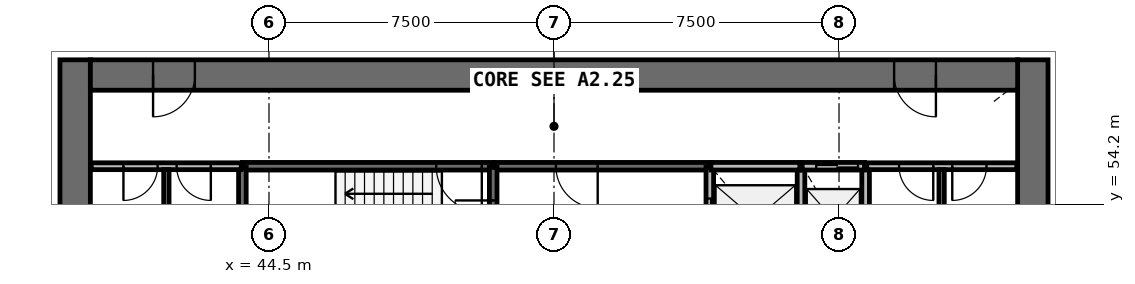
"""IFC4 building model, lengths in metres.
Left out: names, types, materials, properties, quantities, classifications, styles, units other than length and angle.
Written with IfcOpenShell. Run it as: python <this file> out.ifc"""

import sys

from ifc_helpers import new_model, si_unit, direction, frame, frame_2d, origin, place, context, subcontext, project, spatial, rectangle, extrude, source, transform, mapped, element, fill, save


model = new_model("IFC4")
c1 = context("Model", 3, precision=1e-05, world=origin(), true_north=direction((0.0, 1.0)))
c2 = subcontext(c1, "Body", "Model", "MODEL_VIEW")
j1 = project(units=[si_unit("LENGTHUNIT", "METRE"), si_unit("PLANEANGLEUNIT", "RADIAN")], contexts=[c1])
p1 = place(None, origin())
s1 = spatial("IfcSite", under=j1, at=p1, CompositionType="ELEMENT")
p2 = place(p1, origin())
s2 = spatial("IfcBuilding", under=s1, at=p2, CompositionType="ELEMENT")
p3 = place(p2, frame((0.0, 0.0, 104.4)))
s3 = spatial("IfcBuildingStorey", under=s2, at=p3, CompositionType="ELEMENT", Elevation=104.4)
p4 = place(p3, frame((64.6, 38.0, 0.0), z_axis=(0.0, 0.0, 1.0), x_axis=(0.0, 1.0, 0.0)))
e1 = element("IfcWall", 1, at=p4, inside=s3, PredefinedType="SHEAR", context=c2, shape_type="SweptSolid", body=[
    extrude(rectangle(XDim=20.0, YDim=0.8, at=frame_2d((10.0, 0.0))), origin(), (0.0, 0.0, 1.0), 4.1),
])
p5 = place(p4, frame((9.1, 0.0, 0.0)))
e2 = element("IfcOpeningElement", 2, at=p5, cuts=e1, PredefinedType="OPENING", context=c2, shape_type="SweptSolid", body=[
    extrude(rectangle(XDim=1.8, YDim=2.1, at=frame_2d((0.9, 1.05))), frame((0.0, 0.41, 0.0), z_axis=(0.0, -1.0, 0.0), x_axis=(1.0, 0.0, 0.0)), (0.0, 0.0, 1.0), 0.82),
])
p6 = place(p3, frame((39.4, 58.0, 0.0), z_axis=(0.0, 0.0, 1.0), x_axis=(0.0, -1.0, 0.0)))
e3 = element("IfcWall", 3, at=p6, inside=s3, PredefinedType="SHEAR", context=c2, shape_type="SweptSolid", body=[
    extrude(rectangle(XDim=20.0, YDim=0.8, at=frame_2d((10.0, 0.0))), origin(), (0.0, 0.0, 1.0), 4.1),
])
p7 = place(p6, frame((9.1, 0.0, 0.0)))
e4 = element("IfcOpeningElement", 4, at=p7, cuts=e3, PredefinedType="OPENING", context=c2, shape_type="SweptSolid", body=[
    extrude(rectangle(XDim=1.8, YDim=2.1, at=frame_2d((0.9, 1.05))), frame((0.0, 0.41, 0.0), z_axis=(0.0, -1.0, 0.0), x_axis=(1.0, 0.0, 0.0)), (0.0, 0.0, 1.0), 0.82),
])
p8 = place(p3, frame((64.2, 57.6, 0.0), z_axis=(0.0, 0.0, 1.0), x_axis=(-1.0, 0.0, 0.0)))
e5 = element("IfcWall", 5, at=p8, inside=s3, PredefinedType="SHEAR", context=c2, shape_type="SweptSolid", body=[
    extrude(rectangle(XDim=24.4, YDim=0.8, at=frame_2d((12.2, 0.0))), origin(), (0.0, 0.0, 1.0), 4.1),
])
p9 = place(p8, frame((21.65, 0.0, 0.0)))
e6 = element("IfcOpeningElement", 6, at=p9, cuts=e5, PredefinedType="OPENING", context=c2, shape_type="SweptSolid", body=[
    extrude(rectangle(XDim=1.1, YDim=2.1, at=frame_2d((0.55, 1.05))), frame((0.0, 0.41, 0.0), z_axis=(0.0, -1.0, 0.0), x_axis=(1.0, 0.0, 0.0)), (0.0, 0.0, 1.0), 0.82),
])
p10 = place(p8, frame((2.15, 0.0, 0.0)))
e7 = element("IfcOpeningElement", 7, at=p10, cuts=e5, PredefinedType="OPENING", context=c2, shape_type="SweptSolid", body=[
    extrude(rectangle(XDim=1.1, YDim=2.1, at=frame_2d((0.55, 1.05))), frame((0.0, 0.41, 0.0), z_axis=(0.0, -1.0, 0.0), x_axis=(1.0, 0.0, 0.0)), (0.0, 0.0, 1.0), 0.82),
])
p11 = place(p3, frame((50.4, 55.2, 0.0), z_axis=(0.0, 0.0, 1.0), x_axis=(-1.0, 0.0, 0.0)))
e8 = element("IfcWall", 8, at=p11, inside=s3, PredefinedType="SOLIDWALL", context=c2, shape_type="SweptSolid", body=[
    extrude(rectangle(XDim=6.6, YDim=0.2, at=frame_2d((3.3, 0.0))), origin(), (0.0, 0.0, 1.0), 3.7),
])
p12 = place(p11, frame((0.3, 0.0, 0.0)))
e9 = element("IfcOpeningElement", 9, at=p12, cuts=e8, PredefinedType="OPENING", context=c2, shape_type="SweptSolid", body=[
    extrude(rectangle(XDim=1.2, YDim=2.1, at=frame_2d((0.6, 1.05))), frame((0.0, 0.11, 0.0), z_axis=(0.0, -1.0, 0.0), x_axis=(1.0, 0.0, 0.0)), (0.0, 0.0, 1.0), 0.22),
])
p13 = place(p3, frame((56.1, 55.2, 0.0), z_axis=(0.0, 0.0, 1.0), x_axis=(-1.0, 0.0, 0.0)))
e10 = element("IfcWall", 10, at=p13, inside=s3, PredefinedType="SOLIDWALL", context=c2, shape_type="SweptSolid", body=[
    extrude(rectangle(XDim=5.67, YDim=0.2, at=frame_2d((2.835, 0.0))), origin(), (0.0, 0.0, 1.0), 3.7),
])
p14 = place(p13, frame((2.95, 0.0, 0.0)))
e11 = element("IfcOpeningElement", 11, at=p14, cuts=e10, PredefinedType="OPENING", context=c2, shape_type="SweptSolid", body=[
    extrude(rectangle(XDim=1.1, YDim=2.1, at=frame_2d((0.55, 1.05))), frame((0.0, 0.11, 0.0), z_axis=(0.0, -1.0, 0.0), x_axis=(1.0, 0.0, 0.0)), (0.0, 0.0, 1.0), 0.22),
])
p15 = place(p3, frame((50.4, 52.4, 0.0), z_axis=(0.0, 0.0, 1.0), x_axis=(0.0, 1.0, 0.0)))
e12 = element("IfcWall", 12, at=p15, inside=s3, PredefinedType="SOLIDWALL", context=c2, shape_type="SweptSolid", body=[
    extrude(rectangle(XDim=2.77, YDim=0.2, at=frame_2d((1.385, 0.0))), origin(), (0.0, 0.0, 1.0), 3.7),
])
p16 = place(p15, frame((0.9, 0.0, 0.0)))
e13 = element("IfcOpeningElement", 13, at=p16, cuts=e12, PredefinedType="OPENING", context=c2, shape_type="SweptSolid", body=[
    extrude(rectangle(XDim=1.0, YDim=2.1, at=frame_2d((0.5, 1.05))), frame((0.0, 0.11, 0.0), z_axis=(0.0, -1.0, 0.0), x_axis=(1.0, 0.0, 0.0)), (0.0, 0.0, 1.0), 0.22),
])
p17 = place(p3, frame((56.1, 55.17, 0.0), z_axis=(0.0, 0.0, 1.0), x_axis=(0.0, -1.0, 0.0)))
e14 = element("IfcWall", 14, at=p17, inside=s3, PredefinedType="SOLIDWALL", context=c2, shape_type="SweptSolid", body=[
    extrude(rectangle(XDim=2.77, YDim=0.2, at=frame_2d((1.385, 0.0))), origin(), (0.0, 0.0, 1.0), 3.7),
])
p18 = place(p17, frame((0.82, 0.0, 0.0)))
e15 = element("IfcOpeningElement", 15, at=p18, cuts=e14, PredefinedType="OPENING", context=c2, shape_type="SweptSolid", body=[
    extrude(rectangle(XDim=1.1, YDim=2.1, at=frame_2d((0.55, 1.05))), frame((0.0, 0.11, 0.0), z_axis=(0.0, -1.0, 0.0), x_axis=(1.0, 0.0, 0.0)), (0.0, 0.0, 1.0), 0.22),
])
for number, where, z_axis, x_axis in (
    (16, (58.5, 52.4, 0.0), (0.0, 0.0, 1.0), (0.0, 1.0, 0.0)),
    (17, (60.2, 52.4, 0.0), (0.0, 0.0, 1.0), (0.0, 1.0, 0.0)),
):
    element("IfcWall", number, at=place(p3, frame(where, z_axis=z_axis, x_axis=x_axis)), inside=s3, PredefinedType="SOLIDWALL", context=c2, shape_type="SweptSolid", body=[
        extrude(rectangle(XDim=2.8, YDim=0.2, at=frame_2d((1.4, 0.0))), origin(), (0.0, 0.0, 1.0), 3.7),
    ])
p19 = place(p3, frame((58.47, 55.2, 0.0), z_axis=(0.0, 0.0, 1.0), x_axis=(-1.0, 0.0, 0.0)))
e18 = element("IfcWall", 18, at=p19, inside=s3, PredefinedType="SOLIDWALL", context=c2, shape_type="SweptSolid", body=[
    extrude(rectangle(XDim=2.34, YDim=0.2, at=frame_2d((1.17, 0.0))), origin(), (0.0, 0.0, 1.0), 3.7),
])
p20 = place(p3, frame((43.8, 55.17, 0.0), z_axis=(0.0, 0.0, 1.0), x_axis=(0.0, -1.0, 0.0)))
e19 = element("IfcWall", 19, at=p20, inside=s3, PredefinedType="SOLIDWALL", context=c2, shape_type="SweptSolid", body=[
    extrude(rectangle(XDim=2.14, YDim=0.2, at=frame_2d((1.07, 0.0))), origin(), (0.0, 0.0, 1.0), 3.7),
])
p21 = place(p3, frame((60.17, 55.2, 0.0), z_axis=(0.0, 0.0, 1.0), x_axis=(-1.0, 0.0, 0.0)))
e20 = element("IfcWall", 20, at=p21, inside=s3, PredefinedType="SOLIDWALL", context=c2, shape_type="SweptSolid", body=[
    extrude(rectangle(XDim=1.64, YDim=0.2, at=frame_2d((0.82, 0.0))), origin(), (0.0, 0.0, 1.0), 3.7),
])
p22 = place(p21, frame((0.17, 0.0, 0.0)))
e21 = element("IfcOpeningElement", 21, at=p22, cuts=e20, PredefinedType="OPENING", context=c2, shape_type="SweptSolid", body=[
    extrude(rectangle(XDim=1.1, YDim=2.1, at=frame_2d((0.55, 1.05))), frame((0.0, 0.11, 0.0), z_axis=(0.0, -1.0, 0.0), x_axis=(1.0, 0.0, 0.0)), (0.0, 0.0, 1.0), 0.22),
])
p23 = place(p3, frame((64.18, 55.2, 0.0), z_axis=(0.0, 0.0, 1.0), x_axis=(-1.0, 0.0, 0.0)))
e22 = element("IfcWall", 22, at=p23, inside=s3, PredefinedType="PARTITIONING", context=c2, shape_type="SweptSolid", body=[
    extrude(rectangle(XDim=3.95, YDim=0.18, at=frame_2d((1.975, 0.0))), origin(), (0.0, 0.0, 1.0), 3.7),
])
p24 = place(p23, frame((2.2, 0.0, 0.0)))
e23 = element("IfcOpeningElement", 23, at=p24, cuts=e22, PredefinedType="OPENING", context=c2, shape_type="SweptSolid", body=[
    extrude(rectangle(XDim=0.9, YDim=2.1, at=frame_2d((0.45, 1.05))), frame((0.0, 0.1, 0.0), z_axis=(0.0, -1.0, 0.0), x_axis=(1.0, 0.0, 0.0)), (0.0, 0.0, 1.0), 0.2),
])
p25 = place(p23, frame((0.8, 0.0, 0.0)))
e24 = element("IfcOpeningElement", 24, at=p25, cuts=e22, PredefinedType="OPENING", context=c2, shape_type="SweptSolid", body=[
    extrude(rectangle(XDim=0.9, YDim=2.1, at=frame_2d((0.45, 1.05))), frame((0.0, 0.1, 0.0), z_axis=(0.0, -1.0, 0.0), x_axis=(1.0, 0.0, 0.0)), (0.0, 0.0, 1.0), 0.2),
])
p26 = place(p3, frame((43.77, 55.2, 0.0), z_axis=(0.0, 0.0, 1.0), x_axis=(-1.0, 0.0, 0.0)))
e25 = element("IfcWall", 25, at=p26, inside=s3, PredefinedType="PARTITIONING", context=c2, shape_type="SweptSolid", body=[
    extrude(rectangle(XDim=3.95, YDim=0.18, at=frame_2d((1.975, 0.0))), origin(), (0.0, 0.0, 1.0), 3.7),
])
p27 = place(p26, frame((2.2, 0.0, 0.0)))
e26 = element("IfcOpeningElement", 26, at=p27, cuts=e25, PredefinedType="OPENING", context=c2, shape_type="SweptSolid", body=[
    extrude(rectangle(XDim=0.9, YDim=2.1, at=frame_2d((0.45, 1.05))), frame((0.0, 0.1, 0.0), z_axis=(0.0, -1.0, 0.0), x_axis=(1.0, 0.0, 0.0)), (0.0, 0.0, 1.0), 0.2),
])
p28 = place(p26, frame((0.8, 0.0, 0.0)))
e27 = element("IfcOpeningElement", 27, at=p28, cuts=e25, PredefinedType="OPENING", context=c2, shape_type="SweptSolid", body=[
    extrude(rectangle(XDim=0.9, YDim=2.1, at=frame_2d((0.45, 1.05))), frame((0.0, 0.1, 0.0), z_axis=(0.0, -1.0, 0.0), x_axis=(1.0, 0.0, 0.0)), (0.0, 0.0, 1.0), 0.2),
])
p29 = place(p3, frame((62.2, 52.4, 0.0), z_axis=(0.0, 0.0, 1.0), x_axis=(0.0, 1.0, 0.0)))
e28 = element("IfcWall", 28, at=p29, inside=s3, PredefinedType="PARTITIONING", context=c2, shape_type="SweptSolid", body=[
    extrude(rectangle(XDim=2.71, YDim=0.14, at=frame_2d((1.355, 0.0))), origin(), (0.0, 0.0, 1.0), 2.9),
])
p30 = place(p3, frame((41.8, 53.1, 0.0), z_axis=(0.0, 0.0, 1.0), x_axis=(0.0, 1.0, 0.0)))
e29 = element("IfcWall", 29, at=p30, inside=s3, PredefinedType="PARTITIONING", context=c2, shape_type="SweptSolid", body=[
    extrude(rectangle(XDim=2.01, YDim=0.14, at=frame_2d((1.005, 0.0))), origin(), (0.0, 0.0, 1.0), 2.9),
])
m1 = source(origin(), c2, "Body", "SweptSolid", [
    extrude(rectangle(XDim=1.1, YDim=2.1, at=frame_2d((0.55, 1.05))), frame((0.0, 0.025, 0.0), z_axis=(0.0, -1.0, 0.0), x_axis=(1.0, 0.0, 0.0)), (0.0, 0.0, 1.0), 0.05),
])
p31 = place(p18, origin())
e30 = element("IfcDoor", 30, at=p31, inside=s3, OperationType="DOUBLE_DOOR_SLIDING", PredefinedType="USERDEFINED", context=c2, shape_type="MappedRepresentation", body=[
    mapped(m1, transform((0.0, 0.0, 0.0), scale=1.0)),
])
fill(e15, e30)
p32 = place(p22, origin())
e31 = element("IfcDoor", 31, at=p32, inside=s3, OperationType="DOUBLE_DOOR_SLIDING", PredefinedType="USERDEFINED", context=c2, shape_type="MappedRepresentation", body=[
    mapped(m1, transform((0.0, 0.0, 0.0), scale=1.0)),
])
fill(e21, e31)
m2 = source(origin(), c2, "Body", "SweptSolid", [
    extrude(rectangle(XDim=1.2, YDim=2.1, at=frame_2d((0.6, 1.05))), frame((0.0, 0.025, 0.0), z_axis=(0.0, -1.0, 0.0), x_axis=(1.0, 0.0, 0.0)), (0.0, 0.0, 1.0), 0.05),
])
p33 = place(p12, origin())
e32 = element("IfcDoor", 32, at=p33, inside=s3, OperationType="SINGLE_SWING_LEFT", PredefinedType="DOOR", context=c2, shape_type="MappedRepresentation", body=[
    mapped(m2, transform((0.0, 0.0, 0.0), scale=1.0)),
])
fill(e9, e32)
m3 = source(origin(), c2, "Body", "SweptSolid", [
    extrude(rectangle(XDim=1.0, YDim=2.1, at=frame_2d((0.5, 1.05))), frame((0.0, 0.025, 0.0), z_axis=(0.0, -1.0, 0.0), x_axis=(1.0, 0.0, 0.0)), (0.0, 0.0, 1.0), 0.05),
])
p34 = place(p16, origin())
e33 = element("IfcDoor", 33, at=p34, inside=s3, OperationType="SINGLE_SWING_RIGHT", PredefinedType="DOOR", context=c2, shape_type="MappedRepresentation", body=[
    mapped(m3, transform((0.0, 0.0, 0.0), scale=1.0)),
])
fill(e13, e33)
m4 = source(origin(), c2, "Body", "SweptSolid", [
    extrude(rectangle(XDim=1.1, YDim=2.1, at=frame_2d((0.55, 1.05))), frame((0.0, 0.025, 0.0), z_axis=(0.0, -1.0, 0.0), x_axis=(1.0, 0.0, 0.0)), (0.0, 0.0, 1.0), 0.05),
])
p35 = place(p14, origin())
e34 = element("IfcDoor", 34, at=p35, inside=s3, OperationType="SINGLE_SWING_LEFT", PredefinedType="DOOR", context=c2, shape_type="MappedRepresentation", body=[
    mapped(m4, transform((0.0, 0.0, 0.0), scale=1.0)),
])
fill(e11, e34)
m5 = source(origin(), c2, "Body", "SweptSolid", [
    extrude(rectangle(XDim=1.1, YDim=2.1, at=frame_2d((0.55, 1.05))), frame((0.0, 0.025, 0.0), z_axis=(0.0, -1.0, 0.0), x_axis=(1.0, 0.0, 0.0)), (0.0, 0.0, 1.0), 0.05),
])
p36 = place(p9, origin())
e35 = element("IfcDoor", 35, at=p36, inside=s3, OperationType="SINGLE_SWING_RIGHT", PredefinedType="DOOR", context=c2, shape_type="MappedRepresentation", body=[
    mapped(m5, transform((0.0, 0.0, 0.0), scale=1.0)),
])
fill(e6, e35)
p37 = place(p10, origin())
e36 = element("IfcDoor", 36, at=p37, inside=s3, OperationType="SINGLE_SWING_LEFT", PredefinedType="DOOR", context=c2, shape_type="MappedRepresentation", body=[
    mapped(m5, transform((0.0, 0.0, 0.0), scale=1.0)),
])
fill(e7, e36)
m6 = source(origin(), c2, "Body", "SweptSolid", [
    extrude(rectangle(XDim=0.9, YDim=2.1, at=frame_2d((0.45, 1.05))), frame((0.0, 0.025, 0.0), z_axis=(0.0, -1.0, 0.0), x_axis=(1.0, 0.0, 0.0)), (0.0, 0.0, 1.0), 0.05),
])
p38 = place(p27, origin())
e37 = element("IfcDoor", 37, at=p38, inside=s3, OperationType="SINGLE_SWING_RIGHT", PredefinedType="DOOR", context=c2, shape_type="MappedRepresentation", body=[
    mapped(m6, transform((0.0, 0.0, 0.0), scale=1.0)),
])
fill(e26, e37)
p39 = place(p28, origin())
e38 = element("IfcDoor", 38, at=p39, inside=s3, OperationType="SINGLE_SWING_LEFT", PredefinedType="DOOR", context=c2, shape_type="MappedRepresentation", body=[
    mapped(m6, transform((0.0, 0.0, 0.0), scale=1.0)),
])
fill(e27, e38)
p40 = place(p24, origin())
e39 = element("IfcDoor", 39, at=p40, inside=s3, OperationType="SINGLE_SWING_LEFT", PredefinedType="DOOR", context=c2, shape_type="MappedRepresentation", body=[
    mapped(m6, transform((0.0, 0.0, 0.0), scale=1.0)),
])
fill(e23, e39)
p41 = place(p25, origin())
e40 = element("IfcDoor", 40, at=p41, inside=s3, OperationType="SINGLE_SWING_RIGHT", PredefinedType="DOOR", context=c2, shape_type="MappedRepresentation", body=[
    mapped(m6, transform((0.0, 0.0, 0.0), scale=1.0)),
])
fill(e24, e40)
save(model, sys.argv[1])
